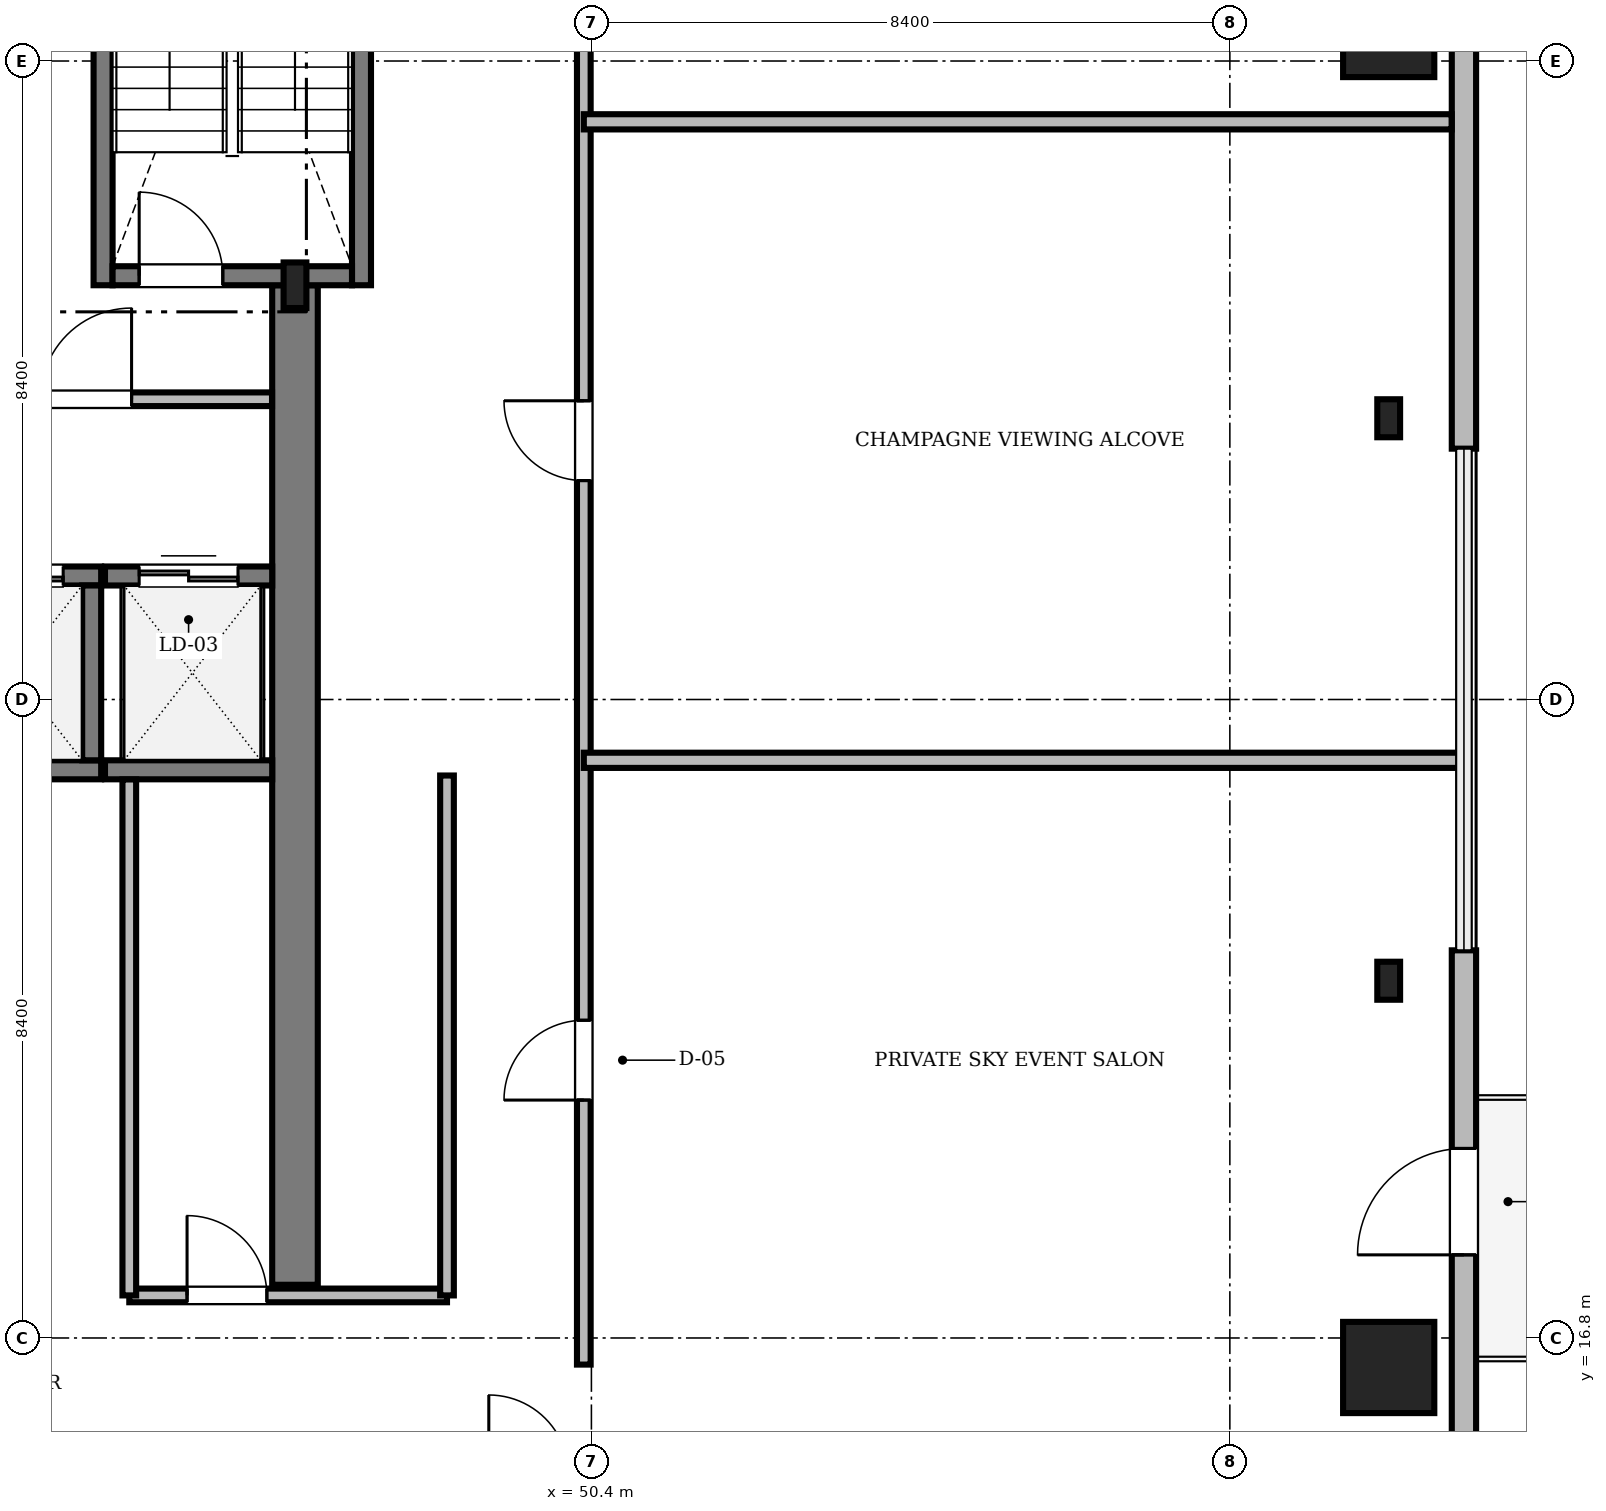
"""IFC4 building model, lengths in metres.
Left out: names, types, materials, properties, quantities, classifications, styles, units other than length and angle.
Written with IfcOpenShell. Run it as: python <this file> out.ifc"""

import sys

from ifc_helpers import new_model, si_unit, direction, frame, frame_2d, origin, origin_2d, place, context, subcontext, project, spatial, rectangle, i_section, extrude, source, transform, mapped, element, fill, save


model = new_model("IFC4")
c1 = context("Model", 3, precision=1e-05, world=origin(), true_north=direction((0.0, 1.0)))
c2 = subcontext(c1, "Body", "Model", "MODEL_VIEW")
j1 = project(units=[si_unit("LENGTHUNIT", "METRE"), si_unit("PLANEANGLEUNIT", "RADIAN")], contexts=[c1])
p1 = place(None, origin())
s1 = spatial("IfcSite", under=j1, at=p1, CompositionType="ELEMENT")
p2 = place(p1, origin())
s2 = spatial("IfcBuilding", under=s1, at=p2, CompositionType="ELEMENT")
p3 = place(p2, frame((0.0, 0.0, 291.15)))
s3 = spatial("IfcBuildingStorey", under=s2, at=p3, CompositionType="ELEMENT", Elevation=291.15)
m1 = source(origin(), c2, "Body", "SweptSolid", [
    extrude(rectangle(XDim=13.15, YDim=0.6, at=frame_2d((6.575, 0.0))), origin(), (0.0, 0.0, 1.0), 4.7),
])
p4 = place(p3, frame((46.5, 17.5, 0.0), z_axis=(0.0, 0.0, 1.0), x_axis=(0.0, 1.0, 0.0)))
e1 = element("IfcWall", 1, at=p4, inside=s3, PredefinedType="SHEAR", context=c2, shape_type="MappedRepresentation", body=[
    mapped(m1, transform((0.0, 0.0, 0.0), scale=1.0)),
])
m2 = source(origin(), c2, "Body", "SweptSolid", [
    extrude(i_section(OverallWidth=0.3, OverallDepth=0.6, WebThickness=0.015, FlangeThickness=0.03, FilletRadius=0.027, at=origin_2d()), origin(), (0.0, 0.0, 1.0), 4.7),
])
p5 = place(p3, frame((46.5, 30.65, 0.0), z_axis=(0.0, 0.0, 1.0), x_axis=(1.0, 0.0, 0.0)))
e2 = element("IfcColumn", 2, at=p5, inside=s3, PredefinedType="COLUMN", context=c2, shape_type="MappedRepresentation", body=[
    mapped(m2, transform((0.0, 0.0, 0.0), scale=1.0)),
])
m3 = source(origin(), c2, "Body", "SweptSolid", [
    extrude(rectangle(XDim=1.2, YDim=1.2, at=origin_2d()), origin(), (0.0, 0.0, 1.0), 4.738),
])
for number, where, z_axis, x_axis in (
    (3, (60.89, 16.412, 0.0), (-0.114, 0.054, 0.992), (-0.429, -0.903, 0.0)),
    (4, (60.89, 33.988, 0.0), (-0.114, -0.054, 0.992), (0.429, -0.903, 0.0)),
):
    element("IfcColumn", number, at=place(p3, frame(where, z_axis=z_axis, x_axis=x_axis)), inside=s3, PredefinedType="COLUMN", context=c2, shape_type="MappedRepresentation", body=[
        mapped(m3, transform((0.0, 0.0, 0.0), scale=1.0)),
    ])
m4 = source(origin(), c2, "Body", "SweptSolid", [
    extrude(i_section(OverallWidth=0.3, OverallDepth=0.5, WebThickness=0.014, FlangeThickness=0.028, FilletRadius=0.027, at=origin_2d()), origin(), (0.0, 0.0, 1.0), 4.731),
])
for number, where, z_axis, x_axis in (
    (5, (60.89, 21.5, 0.0), (-0.114, 0.0, 0.993), (0.0, -1.0, 0.0)),
    (6, (60.89, 28.9, 0.0), (-0.114, 0.0, 0.993), (0.0, -1.0, 0.0)),
):
    element("IfcColumn", number, at=place(p3, frame(where, z_axis=z_axis, x_axis=x_axis)), inside=s3, PredefinedType="COLUMN", context=c2, shape_type="MappedRepresentation", body=[
        mapped(m4, transform((0.0, 0.0, 0.0), scale=1.0)),
    ])
m5 = source(origin(), c2, "Body", "SweptSolid", [
    extrude(rectangle(XDim=11.347, YDim=0.32, at=frame_2d((5.673, 0.0))), origin(), (0.0, 0.0, 1.0), 4.7),
])
p6 = place(p3, frame((61.88, 10.553, 0.0), z_axis=(0.0, 0.0, 1.0), x_axis=(0.0, 1.0, 0.0)))
e7 = element("IfcWall", 7, at=p6, inside=s3, PredefinedType="SOLIDWALL", context=c2, shape_type="MappedRepresentation", body=[
    mapped(m5, transform((0.0, 0.0, 0.0), scale=1.0)),
])
m6 = source(origin(), c2, "Body", "SweptSolid", [
    extrude(rectangle(XDim=1.4, YDim=2.3, at=frame_2d((0.7, 1.15))), frame((0.0, 0.17, 0.0), z_axis=(0.0, -1.0, 0.0), x_axis=(1.0, 0.0, 0.0)), (0.0, 0.0, 1.0), 0.34),
])
p7 = place(p6, frame((7.341, 0.0, 0.0)))
e8 = element("IfcOpeningElement", 8, at=p7, cuts=e7, PredefinedType="OPENING", context=c2, shape_type="MappedRepresentation", body=[
    mapped(m6, transform((0.0, 0.0, 0.0), scale=1.0)),
])
m7 = source(origin(), c2, "Body", "SweptSolid", [
    extrude(rectangle(XDim=2.4, YDim=3.2, at=frame_2d((1.2, 1.6))), frame((0.0, 0.17, 0.0), z_axis=(0.0, -1.0, 0.0), x_axis=(1.0, 0.0, 0.0)), (0.0, 0.0, 1.0), 0.34),
])
p8 = place(p6, frame((2.054, 0.0, 0.72)))
e9 = element("IfcOpeningElement", 9, at=p8, cuts=e7, PredefinedType="OPENING", context=c2, shape_type="MappedRepresentation", body=[
    mapped(m7, transform((0.0, 0.0, 0.0), scale=1.0)),
])
p9 = place(p3, frame((61.88, 28.5, 0.0), z_axis=(0.0, 0.0, 1.0), x_axis=(0.0, 1.0, 0.0)))
e10 = element("IfcWall", 10, at=p9, inside=s3, PredefinedType="SOLIDWALL", context=c2, shape_type="MappedRepresentation", body=[
    mapped(m5, transform((0.0, 0.0, 0.0), scale=1.0)),
])
p10 = place(p9, frame((6.893, 0.0, 0.72)))
e11 = element("IfcOpeningElement", 11, at=p10, cuts=e10, PredefinedType="OPENING", context=c2, shape_type="MappedRepresentation", body=[
    mapped(m7, transform((0.0, 0.0, 0.0), scale=1.0)),
])
m8 = source(origin(), c2, "Body", "SweptSolid", [
    extrude(rectangle(XDim=9.35, YDim=0.25, at=frame_2d((4.675, 0.0))), origin(), (0.0, 0.0, 1.0), 4.8),
])
for number, where, z_axis, x_axis in (
    (12, (43.975, 30.65, 0.0), (0.0, 0.0, 1.0), (0.0, 1.0, 0.0)),
    (13, (47.375, 30.65, 0.0), (0.0, 0.0, 1.0), (0.0, 1.0, 0.0)),
):
    element("IfcWall", number, at=place(p3, frame(where, z_axis=z_axis, x_axis=x_axis)), inside=s3, PredefinedType="SOLIDWALL", context=c2, shape_type="MappedRepresentation", body=[
        mapped(m8, transform((0.0, 0.0, 0.0), scale=1.0)),
    ])
m9 = source(origin(), c2, "Body", "SweptSolid", [
    extrude(rectangle(XDim=3.15, YDim=0.25, at=frame_2d((1.575, 0.0))), origin(), (0.0, 0.0, 1.0), 4.8),
])
p11 = place(p3, frame((44.1, 30.775, 0.0), z_axis=(0.0, 0.0, 1.0), x_axis=(1.0, 0.0, 0.0)))
e14 = element("IfcWall", 14, at=p11, inside=s3, PredefinedType="SOLIDWALL", context=c2, shape_type="MappedRepresentation", body=[
    mapped(m9, transform((0.0, 0.0, 0.0), scale=1.0)),
])
m10 = source(origin(), c2, "Body", "SweptSolid", [
    extrude(rectangle(XDim=1.1, YDim=2.2, at=frame_2d((0.55, 1.1))), frame((0.0, 0.135, 0.0), z_axis=(0.0, -1.0, 0.0), x_axis=(1.0, 0.0, 0.0)), (0.0, 0.0, 1.0), 0.27),
])
p12 = place(p11, frame((0.35, 0.0, 0.0)))
e15 = element("IfcOpeningElement", 15, at=p12, cuts=e14, PredefinedType="OPENING", context=c2, shape_type="MappedRepresentation", body=[
    mapped(m10, transform((0.0, 0.0, 0.0), scale=1.0)),
])
m11 = source(origin(), c2, "Body", "SweptSolid", [
    extrude(rectangle(XDim=2.3, YDim=0.25, at=frame_2d((1.15, 0.0))), origin(), (0.0, 0.0, 1.0), 4.7),
])
p13 = place(p3, frame((41.65, 24.275, 0.0), z_axis=(0.0, 0.0, 1.0), x_axis=(1.0, 0.0, 0.0)))
e16 = element("IfcWall", 16, at=p13, inside=s3, PredefinedType="SOLIDWALL", context=c2, shape_type="MappedRepresentation", body=[
    mapped(m11, transform((0.0, 0.0, 0.0), scale=1.0)),
])
p14 = place(p3, frame((41.65, 26.825, 0.0), z_axis=(0.0, 0.0, 1.0), x_axis=(1.0, 0.0, 0.0)))
e17 = element("IfcWall", 17, at=p14, inside=s3, PredefinedType="SOLIDWALL", context=c2, shape_type="MappedRepresentation", body=[
    mapped(m11, transform((0.0, 0.0, 0.0), scale=1.0)),
])
m12 = source(origin(), c2, "Body", "SweptSolid", [
    extrude(rectangle(XDim=1.3, YDim=2.3, at=frame_2d((0.65, 1.15))), frame((0.0, 0.135, 0.0), z_axis=(0.0, -1.0, 0.0), x_axis=(1.0, 0.0, 0.0)), (0.0, 0.0, 1.0), 0.27),
])
p15 = place(p14, frame((0.5, 0.0, 0.0)))
e18 = element("IfcOpeningElement", 18, at=p15, cuts=e17, PredefinedType="OPENING", context=c2, shape_type="MappedRepresentation", body=[
    mapped(m12, transform((0.0, 0.0, 0.0), scale=1.0)),
])
p16 = place(p3, frame((43.825, 24.4, 0.0), z_axis=(0.0, 0.0, 1.0), x_axis=(0.0, 1.0, 0.0)))
e19 = element("IfcWall", 19, at=p16, inside=s3, PredefinedType="SOLIDWALL", context=c2, shape_type="MappedRepresentation", body=[
    mapped(m11, transform((0.0, 0.0, 0.0), scale=1.0)),
])
m13 = source(origin(), c2, "Body", "SweptSolid", [
    extrude(rectangle(XDim=2.2, YDim=0.25, at=frame_2d((1.1, 0.0))), origin(), (0.0, 0.0, 1.0), 4.7),
])
p17 = place(p3, frame((44.0, 24.275, 0.0), z_axis=(0.0, 0.0, 1.0), x_axis=(1.0, 0.0, 0.0)))
e20 = element("IfcWall", 20, at=p17, inside=s3, PredefinedType="SOLIDWALL", context=c2, shape_type="MappedRepresentation", body=[
    mapped(m13, transform((0.0, 0.0, 0.0), scale=1.0)),
])
p18 = place(p3, frame((44.0, 26.825, 0.0), z_axis=(0.0, 0.0, 1.0), x_axis=(1.0, 0.0, 0.0)))
e21 = element("IfcWall", 21, at=p18, inside=s3, PredefinedType="SOLIDWALL", context=c2, shape_type="MappedRepresentation", body=[
    mapped(m13, transform((0.0, 0.0, 0.0), scale=1.0)),
])
p19 = place(p18, frame((0.45, 0.0, 0.0)))
e22 = element("IfcOpeningElement", 22, at=p19, cuts=e21, PredefinedType="OPENING", context=c2, shape_type="MappedRepresentation", body=[
    mapped(m12, transform((0.0, 0.0, 0.0), scale=1.0)),
])
m14 = source(origin(), c2, "Body", "SweptSolid", [
    extrude(rectangle(XDim=26.968, YDim=0.18, at=frame_2d((13.484, 0.0))), origin(), (0.0, 0.0, 1.0), 3.942),
])
p20 = place(p3, frame((50.3, 16.45, 0.0), z_axis=(0.0, 0.0, 1.0), x_axis=(0.0, 1.0, 0.0)))
e23 = element("IfcWall", 23, at=p20, inside=s3, PredefinedType="PARTITIONING", context=c2, shape_type="MappedRepresentation", body=[
    mapped(m14, transform((0.0, 0.0, 0.0), scale=1.0)),
])
m15 = source(origin(), c2, "Body", "SweptSolid", [
    extrude(rectangle(XDim=1.05, YDim=2.2, at=frame_2d((0.525, 1.1))), frame((0.0, 0.1, 0.0), z_axis=(0.0, -1.0, 0.0), x_axis=(1.0, 0.0, 0.0)), (0.0, 0.0, 1.0), 0.2),
])
p21 = place(p20, frame((3.48, 0.0, 0.0)))
e24 = element("IfcOpeningElement", 24, at=p21, cuts=e23, PredefinedType="OPENING", context=c2, shape_type="MappedRepresentation", body=[
    mapped(m15, transform((0.0, 0.0, 0.0), scale=1.0)),
])
p22 = place(p20, frame((11.63, 0.0, 0.0)))
e25 = element("IfcOpeningElement", 25, at=p22, cuts=e23, PredefinedType="OPENING", context=c2, shape_type="MappedRepresentation", body=[
    mapped(m15, transform((0.0, 0.0, 0.0), scale=1.0)),
])
p23 = place(p20, frame((21.125, 0.0, 0.0)))
e26 = element("IfcOpeningElement", 26, at=p23, cuts=e23, PredefinedType="OPENING", context=c2, shape_type="MappedRepresentation", body=[
    mapped(m15, transform((0.0, 0.0, 0.0), scale=1.0)),
])
m16 = source(origin(), c2, "Body", "SweptSolid", [
    extrude(rectangle(XDim=4.648, YDim=0.18, at=frame_2d((2.324, 0.0))), origin(), (0.0, 0.0, 1.0), 4.332),
])
p24 = place(p3, frame((41.55, 29.15, 0.0), z_axis=(0.0, 0.0, 1.0), x_axis=(1.0, 0.0, 0.0)))
e27 = element("IfcWall", 27, at=p24, inside=s3, PredefinedType="PARTITIONING", context=c2, shape_type="MappedRepresentation", body=[
    mapped(m16, transform((0.0, 0.0, 0.0), scale=1.0)),
])
m17 = source(origin(), c2, "Body", "SweptSolid", [
    extrude(rectangle(XDim=1.2, YDim=2.2, at=frame_2d((0.6, 1.1))), frame((0.0, 0.1, 0.0), z_axis=(0.0, -1.0, 0.0), x_axis=(1.0, 0.0, 0.0)), (0.0, 0.0, 1.0), 0.2),
])
p25 = place(p24, frame((1.6, 0.0, 0.0)))
e28 = element("IfcOpeningElement", 28, at=p25, cuts=e27, PredefinedType="OPENING", context=c2, shape_type="MappedRepresentation", body=[
    mapped(m17, transform((0.0, 0.0, 0.0), scale=1.0)),
])
m18 = source(origin(), c2, "Body", "SweptSolid", [
    extrude(rectangle(XDim=4.18, YDim=0.18, at=frame_2d((2.09, 0.0))), origin(), (0.0, 0.0, 1.0), 4.142),
])
p26 = place(p3, frame((44.32, 17.36, 0.0), z_axis=(0.0, 0.0, 1.0), x_axis=(1.0, 0.0, 0.0)))
e29 = element("IfcWall", 29, at=p26, inside=s3, PredefinedType="PARTITIONING", context=c2, shape_type="MappedRepresentation", body=[
    mapped(m18, transform((0.0, 0.0, 0.0), scale=1.0)),
])
p27 = place(p26, frame((0.76, 0.0, 0.0)))
e30 = element("IfcOpeningElement", 30, at=p27, cuts=e29, PredefinedType="OPENING", context=c2, shape_type="MappedRepresentation", body=[
    mapped(m15, transform((0.0, 0.0, 0.0), scale=1.0)),
])
m19 = source(origin(), c2, "Body", "SweptSolid", [
    extrude(rectangle(XDim=11.59, YDim=0.2, at=frame_2d((5.795, 0.0))), origin(), (0.0, 0.0, 1.0), 3.942),
])
p28 = place(p3, frame((50.3, 24.4, 0.0), z_axis=(0.0, 0.0, 1.0), x_axis=(1.0, 0.0, 0.0)))
e31 = element("IfcWall", 31, at=p28, inside=s3, PredefinedType="PARTITIONING", context=c2, shape_type="MappedRepresentation", body=[
    mapped(m19, transform((0.0, 0.0, 0.0), scale=1.0)),
])
m20 = source(origin(), c2, "Body", "SweptSolid", [
    extrude(rectangle(XDim=11.418, YDim=0.2, at=frame_2d((5.709, 0.0))), origin(), (0.0, 0.0, 1.0), 3.942),
])
p29 = place(p3, frame((50.3, 32.8, 0.0), z_axis=(0.0, 0.0, 1.0), x_axis=(1.0, 0.0, 0.0)))
e32 = element("IfcWall", 32, at=p29, inside=s3, PredefinedType="PARTITIONING", context=c2, shape_type="MappedRepresentation", body=[
    mapped(m20, transform((0.0, 0.0, 0.0), scale=1.0)),
])
m21 = source(origin(), c2, "Body", "SweptSolid", [
    extrude(rectangle(XDim=6.788, YDim=0.18, at=frame_2d((3.394, 0.0))), origin(), (0.0, 0.0, 1.0), 4.142),
])
p30 = place(p3, frame((44.32, 17.36, 0.0), z_axis=(0.0, 0.0, 1.0), x_axis=(0.0, 1.0, 0.0)))
e33 = element("IfcWall", 33, at=p30, inside=s3, PredefinedType="PARTITIONING", context=c2, shape_type="MappedRepresentation", body=[
    mapped(m21, transform((0.0, 0.0, 0.0), scale=1.0)),
])
m22 = source(origin(), c2, "Body", "SweptSolid", [
    extrude(rectangle(XDim=6.84, YDim=0.18, at=frame_2d((3.42, 0.0))), origin(), (0.0, 0.0, 1.0), 4.142),
])
p31 = place(p3, frame((48.5, 17.36, 0.0), z_axis=(0.0, 0.0, 1.0), x_axis=(0.0, 1.0, 0.0)))
e34 = element("IfcWall", 34, at=p31, inside=s3, PredefinedType="PARTITIONING", context=c2, shape_type="MappedRepresentation", body=[
    mapped(m22, transform((0.0, 0.0, 0.0), scale=1.0)),
])
m23 = source(origin(), c2, "Body", "SweptSolid", [
    extrude(rectangle(XDim=1.4, YDim=2.3, at=frame_2d((0.7, 1.15))), frame((0.0, 0.025, 0.0), z_axis=(0.0, -1.0, 0.0), x_axis=(1.0, 0.0, 0.0)), (0.0, 0.0, 1.0), 0.05),
])
p32 = place(p7, frame((1.4, 0.0, 0.0), z_axis=(0.0, 0.0, 1.0), x_axis=(-1.0, 0.0, 0.0)))
e35 = element("IfcDoor", 35, at=p32, inside=s3, OperationType="DOUBLE_DOOR_SLIDING", PredefinedType="DOOR", context=c2, shape_type="MappedRepresentation", body=[
    mapped(m23, transform((0.0, 0.0, 0.0), scale=1.0)),
])
fill(e8, e35)
m24 = source(origin(), c2, "Body", "SweptSolid", [
    extrude(rectangle(XDim=1.1, YDim=2.2, at=frame_2d((0.55, 1.1))), frame((0.0, 0.025, 0.0), z_axis=(0.0, -1.0, 0.0), x_axis=(1.0, 0.0, 0.0)), (0.0, 0.0, 1.0), 0.05),
])
p33 = place(p12, origin())
e36 = element("IfcDoor", 36, at=p33, inside=s3, OperationType="SINGLE_SWING_LEFT", PredefinedType="DOOR", context=c2, shape_type="MappedRepresentation", body=[
    mapped(m24, transform((0.0, 0.0, 0.0), scale=1.0)),
])
fill(e15, e36)
m25 = source(origin(), c2, "Body", "SweptSolid", [
    extrude(rectangle(XDim=1.3, YDim=2.3, at=frame_2d((0.65, 1.15))), frame((0.0, 0.025, 0.0), z_axis=(0.0, -1.0, 0.0), x_axis=(1.0, 0.0, 0.0)), (0.0, 0.0, 1.0), 0.05),
])
p34 = place(p15, origin())
e37 = element("IfcDoor", 37, at=p34, inside=s3, OperationType="DOUBLE_DOOR_SLIDING", PredefinedType="DOOR", context=c2, shape_type="MappedRepresentation", body=[
    mapped(m25, transform((0.0, 0.0, 0.0), scale=1.0)),
])
fill(e18, e37)
p35 = place(p19, origin())
e38 = element("IfcDoor", 38, at=p35, inside=s3, OperationType="DOUBLE_DOOR_SLIDING", PredefinedType="DOOR", context=c2, shape_type="MappedRepresentation", body=[
    mapped(m25, transform((0.0, 0.0, 0.0), scale=1.0)),
])
fill(e22, e38)
m26 = source(origin(), c2, "Body", "SweptSolid", [
    extrude(rectangle(XDim=1.05, YDim=2.2, at=frame_2d((0.525, 1.1))), frame((0.0, 0.025, 0.0), z_axis=(0.0, -1.0, 0.0), x_axis=(1.0, 0.0, 0.0)), (0.0, 0.0, 1.0), 0.05),
])
p36 = place(p21, origin())
e39 = element("IfcDoor", 39, at=p36, inside=s3, OperationType="SINGLE_SWING_LEFT", PredefinedType="DOOR", context=c2, shape_type="MappedRepresentation", body=[
    mapped(m26, transform((0.0, 0.0, 0.0), scale=1.0)),
])
fill(e24, e39)
p37 = place(p22, origin())
e40 = element("IfcDoor", 40, at=p37, inside=s3, OperationType="SINGLE_SWING_RIGHT", PredefinedType="DOOR", context=c2, shape_type="MappedRepresentation", body=[
    mapped(m26, transform((0.0, 0.0, 0.0), scale=1.0)),
])
fill(e25, e40)
m27 = source(origin(), c2, "Body", "SweptSolid", [
    extrude(rectangle(XDim=1.2, YDim=2.2, at=frame_2d((0.6, 1.1))), frame((0.0, 0.025, 0.0), z_axis=(0.0, -1.0, 0.0), x_axis=(1.0, 0.0, 0.0)), (0.0, 0.0, 1.0), 0.05),
])
p38 = place(p25, origin())
e41 = element("IfcDoor", 41, at=p38, inside=s3, OperationType="SINGLE_SWING_RIGHT", PredefinedType="DOOR", context=c2, shape_type="MappedRepresentation", body=[
    mapped(m27, transform((0.0, 0.0, 0.0), scale=1.0)),
])
fill(e28, e41)
p39 = place(p27, origin())
e42 = element("IfcDoor", 42, at=p39, inside=s3, OperationType="SINGLE_SWING_LEFT", PredefinedType="DOOR", context=c2, shape_type="MappedRepresentation", body=[
    mapped(m26, transform((0.0, 0.0, 0.0), scale=1.0)),
])
fill(e30, e42)
save(model, sys.argv[1])
